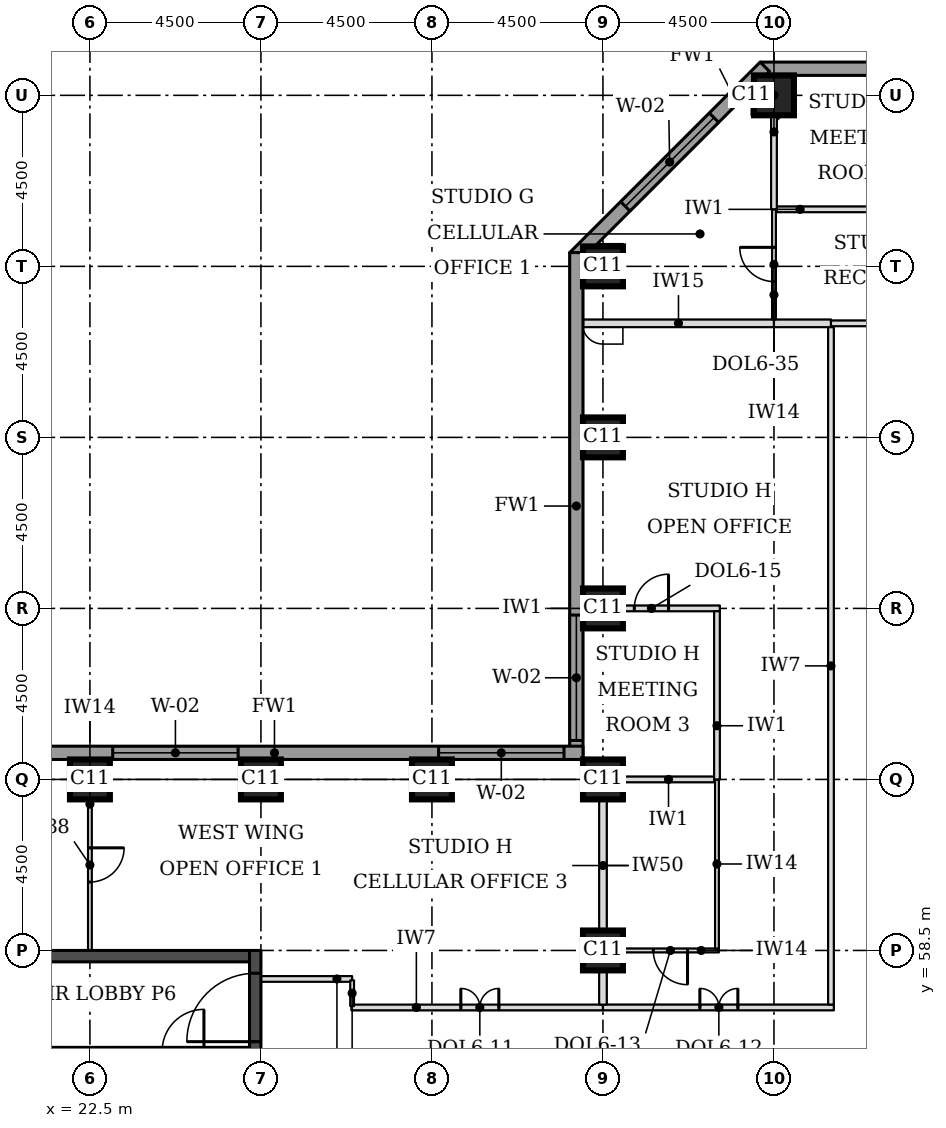
"""IFC4 building model, lengths in metres.
Left out: names, types, materials, properties, quantities, classifications, styles, units other than length and angle.
Written with IfcOpenShell. Run it as: python <this file> out.ifc"""

import sys

from ifc_helpers import new_model, si_unit, direction, frame, frame_2d, origin, origin_2d, place, context, subcontext, project, spatial, rectangle, extrude, element, fill, save


model = new_model("IFC4")
c1 = context("Model", 3, precision=1e-05, world=origin(), true_north=direction((0.0, 1.0)))
c2 = subcontext(c1, "Body", "Model", "MODEL_VIEW")
j1 = project(units=[si_unit("LENGTHUNIT", "METRE"), si_unit("PLANEANGLEUNIT", "RADIAN")], contexts=[c1])
p1 = place(None, origin())
s1 = spatial("IfcSite", under=j1, at=p1, CompositionType="ELEMENT")
p2 = place(p1, origin())
s2 = spatial("IfcBuilding", under=s1, at=p2, CompositionType="ELEMENT")
p3 = place(p2, frame((0.0, 0.0, 119.6)))
s3 = spatial("IfcBuildingStorey", under=s2, at=p3, CompositionType="ELEMENT", Elevation=119.6)
for number, where, z_axis, x_axis in (
    (1, (36.0, 58.5, 0.0), (0.0, 0.0, 1.0), (1.0, 0.0, 0.0)),
    (2, (22.5, 63.0, 0.0), (0.0, 0.0, 1.0), (1.0, 0.0, 0.0)),
    (3, (27.0, 63.0, 0.0), (0.0, 0.0, 1.0), (1.0, 0.0, 0.0)),
    (4, (31.5, 63.0, 0.0), (0.0, 0.0, 1.0), (1.0, 0.0, 0.0)),
    (5, (36.0, 63.0, 0.0), (0.0, 0.0, 1.0), (1.0, 0.0, 0.0)),
    (6, (36.0, 67.5, 0.0), (0.0, 0.0, 1.0), (1.0, 0.0, 0.0)),
    (7, (36.0, 72.0, 0.0), (0.0, 0.0, 1.0), (1.0, 0.0, 0.0)),
    (8, (36.0, 76.5, 0.0), (0.0, 0.0, 1.0), (1.0, 0.0, 0.0)),
    (9, (40.5, 81.0, 0.0), (0.0, 0.0, 1.0), (1.0, 0.0, 0.0)),
):
    element("IfcColumn", number, at=place(p3, frame(where, z_axis=z_axis, x_axis=x_axis)), inside=s3, PredefinedType="COLUMN", context=c2, shape_type="SweptSolid", body=[
        extrude(rectangle(XDim=1.05, YDim=1.05, at=origin_2d()), origin(), (0.0, 0.0, 1.0), 3.7),
    ])
p4 = place(p3, frame((18.3, 58.35, 0.0), z_axis=(0.0, 0.0, 1.0), x_axis=(1.0, 0.0, 0.0)))
e10 = element("IfcWall", 10, at=p4, inside=s3, PredefinedType="SHEAR", context=c2, shape_type="SweptSolid", body=[
    extrude(rectangle(XDim=8.4, YDim=0.3, at=frame_2d((4.2, 0.0))), origin(), (0.0, 0.0, 1.0), 3.7),
])
p5 = place(p3, frame((26.85, 49.5, 0.0), z_axis=(0.0, 0.0, 1.0), x_axis=(0.0, 1.0, 0.0)))
e11 = element("IfcWall", 11, at=p5, inside=s3, PredefinedType="SHEAR", context=c2, shape_type="SweptSolid", body=[
    extrude(rectangle(XDim=9.0, YDim=0.3, at=frame_2d((4.5, 0.0))), origin(), (0.0, 0.0, 1.0), 3.7),
])
p6 = place(p5, frame((6.6, 0.0, 0.0)))
e12 = element("IfcOpeningElement", 12, at=p6, cuts=e11, PredefinedType="OPENING", context=c2, shape_type="SweptSolid", body=[
    extrude(rectangle(XDim=1.8, YDim=2.1, at=frame_2d((0.9, 1.05))), frame((0.0, 0.16, 0.0), z_axis=(0.0, -1.0, 0.0), x_axis=(1.0, 0.0, 0.0)), (0.0, 0.0, 1.0), 0.32),
])
p7 = place(p3, frame((72.362, 81.7, 0.0), z_axis=(0.0, 0.0, 1.0), x_axis=(-1.0, 0.0, 0.0)))
e13 = element("IfcWall", 13, at=p7, inside=s3, PredefinedType="STANDARD", context=c2, shape_type="SweptSolid", body=[
    extrude(rectangle(XDim=32.225, YDim=0.35, at=frame_2d((16.112, 0.0))), origin(), (0.0, 0.0, 1.0), 3.525),
])
p8 = place(p7, frame((5.462, 0.0, 0.9)))
e14 = element("IfcOpeningElement", 14, at=p8, cuts=e13, PredefinedType="OPENING", context=c2, shape_type="SweptSolid", body=[
    extrude(rectangle(XDim=3.3, YDim=1.9, at=frame_2d((1.65, 0.95))), frame((0.0, 0.185, 0.0), z_axis=(0.0, -1.0, 0.0), x_axis=(1.0, 0.0, 0.0)), (0.0, 0.0, 1.0), 0.37),
])
p9 = place(p7, frame((9.962, 0.0, 0.9)))
e15 = element("IfcOpeningElement", 15, at=p9, cuts=e13, PredefinedType="OPENING", context=c2, shape_type="SweptSolid", body=[
    extrude(rectangle(XDim=3.3, YDim=1.9, at=frame_2d((1.65, 0.95))), frame((0.0, 0.185, 0.0), z_axis=(0.0, -1.0, 0.0), x_axis=(1.0, 0.0, 0.0)), (0.0, 0.0, 1.0), 0.37),
])
p10 = place(p7, frame((14.462, 0.0, 0.9)))
e16 = element("IfcOpeningElement", 16, at=p10, cuts=e13, PredefinedType="OPENING", context=c2, shape_type="SweptSolid", body=[
    extrude(rectangle(XDim=3.3, YDim=1.9, at=frame_2d((1.65, 0.95))), frame((0.0, 0.185, 0.0), z_axis=(0.0, -1.0, 0.0), x_axis=(1.0, 0.0, 0.0)), (0.0, 0.0, 1.0), 0.37),
])
p11 = place(p7, frame((18.962, 0.0, 0.9)))
e17 = element("IfcOpeningElement", 17, at=p11, cuts=e13, PredefinedType="OPENING", context=c2, shape_type="SweptSolid", body=[
    extrude(rectangle(XDim=3.3, YDim=1.9, at=frame_2d((1.65, 0.95))), frame((0.0, 0.185, 0.0), z_axis=(0.0, -1.0, 0.0), x_axis=(1.0, 0.0, 0.0)), (0.0, 0.0, 1.0), 0.37),
])
p12 = place(p7, frame((23.462, 0.0, 0.9)))
e18 = element("IfcOpeningElement", 18, at=p12, cuts=e13, PredefinedType="OPENING", context=c2, shape_type="SweptSolid", body=[
    extrude(rectangle(XDim=3.3, YDim=1.9, at=frame_2d((1.65, 0.95))), frame((0.0, 0.185, 0.0), z_axis=(0.0, -1.0, 0.0), x_axis=(1.0, 0.0, 0.0)), (0.0, 0.0, 1.0), 0.37),
])
p13 = place(p3, frame((40.261, 81.751, 0.0), z_axis=(0.0, 0.0, 1.0), x_axis=(-0.707106781187, -0.707106781187, 0.0)))
e19 = element("IfcWall", 19, at=p13, inside=s3, PredefinedType="STANDARD", context=c2, shape_type="SweptSolid", body=[
    extrude(rectangle(XDim=7.089, YDim=0.35, at=frame_2d((3.544, 0.0))), origin(), (0.0, 0.0, 1.0), 3.525),
])
p14 = place(p13, frame((1.894, 0.0, 0.9)))
e20 = element("IfcOpeningElement", 20, at=p14, cuts=e19, PredefinedType="OPENING", context=c2, shape_type="SweptSolid", body=[
    extrude(rectangle(XDim=3.3, YDim=1.9, at=frame_2d((1.65, 0.95))), frame((0.0, 0.185, 0.0), z_axis=(0.0, -1.0, 0.0), x_axis=(1.0, 0.0, 0.0)), (0.0, 0.0, 1.0), 0.37),
])
p15 = place(p3, frame((35.3, 76.862, 0.0), z_axis=(0.0, 0.0, 1.0), x_axis=(0.0, -1.0, 0.0)))
e21 = element("IfcWall", 21, at=p15, inside=s3, PredefinedType="STANDARD", context=c2, shape_type="SweptSolid", body=[
    extrude(rectangle(XDim=13.337, YDim=0.35, at=frame_2d((6.669, 0.0))), origin(), (0.0, 0.0, 1.0), 3.525),
])
p16 = place(p15, frame((9.537, 0.0, 0.9)))
e22 = element("IfcOpeningElement", 22, at=p16, cuts=e21, PredefinedType="OPENING", context=c2, shape_type="SweptSolid", body=[
    extrude(rectangle(XDim=3.3, YDim=1.9, at=frame_2d((1.65, 0.95))), frame((0.0, 0.185, 0.0), z_axis=(0.0, -1.0, 0.0), x_axis=(1.0, 0.0, 0.0)), (0.0, 0.0, 1.0), 0.37),
])
p17 = place(p3, frame((35.475, 63.7, 0.0), z_axis=(0.0, 0.0, 1.0), x_axis=(-1.0, 0.0, 0.0)))
e23 = element("IfcWall", 23, at=p17, inside=s3, PredefinedType="STANDARD", context=c2, shape_type="SweptSolid", body=[
    extrude(rectangle(XDim=17.837, YDim=0.35, at=frame_2d((8.919, 0.0))), origin(), (0.0, 0.0, 1.0), 3.525),
])
p18 = place(p17, frame((0.5, 0.0, 0.9)))
e24 = element("IfcOpeningElement", 24, at=p18, cuts=e23, PredefinedType="OPENING", context=c2, shape_type="SweptSolid", body=[
    extrude(rectangle(XDim=3.3, YDim=1.9, at=frame_2d((1.65, 0.95))), frame((0.0, 0.185, 0.0), z_axis=(0.0, -1.0, 0.0), x_axis=(1.0, 0.0, 0.0)), (0.0, 0.0, 1.0), 0.37),
])
p19 = place(p17, frame((9.075, 0.0, 0.9)))
e25 = element("IfcOpeningElement", 25, at=p19, cuts=e23, PredefinedType="OPENING", context=c2, shape_type="SweptSolid", body=[
    extrude(rectangle(XDim=3.3, YDim=1.9, at=frame_2d((1.65, 0.95))), frame((0.0, 0.185, 0.0), z_axis=(0.0, -1.0, 0.0), x_axis=(1.0, 0.0, 0.0)), (0.0, 0.0, 1.0), 0.37),
])
p20 = place(p3, frame((29.38, 57.0, 0.0), z_axis=(0.0, 0.0, 1.0), x_axis=(1.0, 0.0, 0.0)))
e26 = element("IfcWall", 26, at=p20, inside=s3, PredefinedType="PARTITIONING", context=c2, shape_type="SweptSolid", body=[
    extrude(rectangle(XDim=6.62, YDim=0.15, at=frame_2d((3.31, 0.0))), origin(), (0.0, 0.0, 1.0), 3.55),
])
p21 = place(p20, frame((2.88, 0.0, 0.0)))
e27 = element("IfcOpeningElement", 27, at=p21, cuts=e26, PredefinedType="OPENING", context=c2, shape_type="SweptSolid", body=[
    extrude(rectangle(XDim=1.0, YDim=2.1, at=frame_2d((0.5, 1.05))), frame((0.0, 0.085, 0.0), z_axis=(0.0, -1.0, 0.0), x_axis=(1.0, 0.0, 0.0)), (0.0, 0.0, 1.0), 0.17),
])
p22 = place(p3, frame((36.0, 57.0, 0.0), z_axis=(0.0, 0.0, 1.0), x_axis=(1.0, 0.0, 0.0)))
e28 = element("IfcWall", 28, at=p22, inside=s3, PredefinedType="PARTITIONING", context=c2, shape_type="SweptSolid", body=[
    extrude(rectangle(XDim=6.075, YDim=0.15, at=frame_2d((3.038, 0.0))), origin(), (0.0, 0.0, 1.0), 3.55),
])
p23 = place(p22, frame((2.55, 0.0, 0.0)))
e29 = element("IfcOpeningElement", 29, at=p23, cuts=e28, PredefinedType="OPENING", context=c2, shape_type="SweptSolid", body=[
    extrude(rectangle(XDim=1.0, YDim=2.1, at=frame_2d((0.5, 1.05))), frame((0.0, 0.085, 0.0), z_axis=(0.0, -1.0, 0.0), x_axis=(1.0, 0.0, 0.0)), (0.0, 0.0, 1.0), 0.17),
])
p24 = place(p3, frame((36.525, 58.5, 0.0), z_axis=(0.0, 0.0, 1.0), x_axis=(1.0, 0.0, 0.0)))
e30 = element("IfcWall", 30, at=p24, inside=s3, PredefinedType="PARTITIONING", context=c2, shape_type="SweptSolid", body=[
    extrude(rectangle(XDim=2.525, YDim=0.1, at=frame_2d((1.263, 0.0))), origin(), (0.0, 0.0, 1.0), 3.55),
])
p25 = place(p24, frame((0.8, 0.0, 0.0)))
e31 = element("IfcOpeningElement", 31, at=p25, cuts=e30, PredefinedType="OPENING", context=c2, shape_type="SweptSolid", body=[
    extrude(rectangle(XDim=0.9, YDim=2.1, at=frame_2d((0.45, 1.05))), frame((0.0, 0.06, 0.0), z_axis=(0.0, -1.0, 0.0), x_axis=(1.0, 0.0, 0.0)), (0.0, 0.0, 1.0), 0.12),
])
p26 = place(p3, frame((36.525, 63.0, 0.0), z_axis=(0.0, 0.0, 1.0), x_axis=(1.0, 0.0, 0.0)))
e32 = element("IfcWall", 32, at=p26, inside=s3, PredefinedType="PARTITIONING", context=c2, shape_type="SweptSolid", body=[
    extrude(rectangle(XDim=2.4, YDim=0.15, at=frame_2d((1.2, 0.0))), origin(), (0.0, 0.0, 1.0), 3.55),
])
p27 = place(p3, frame((35.475, 67.5, 0.0), z_axis=(0.0, 0.0, 1.0), x_axis=(1.0, 0.0, 0.0)))
e33 = element("IfcWall", 33, at=p27, inside=s3, PredefinedType="PARTITIONING", context=c2, shape_type="SweptSolid", body=[
    extrude(rectangle(XDim=3.6, YDim=0.15, at=frame_2d((1.8, 0.0))), origin(), (0.0, 0.0, 1.0), 3.55),
])
p28 = place(p27, frame((1.35, 0.0, 0.0)))
e34 = element("IfcOpeningElement", 34, at=p28, cuts=e33, PredefinedType="OPENING", context=c2, shape_type="SweptSolid", body=[
    extrude(rectangle(XDim=0.9, YDim=2.1, at=frame_2d((0.45, 1.05))), frame((0.0, 0.085, 0.0), z_axis=(0.0, -1.0, 0.0), x_axis=(1.0, 0.0, 0.0)), (0.0, 0.0, 1.0), 0.17),
])
p29 = place(p3, frame((35.475, 75.0, 0.0), z_axis=(0.0, 0.0, 1.0), x_axis=(1.0, 0.0, 0.0)))
e35 = element("IfcWall", 35, at=p29, inside=s3, PredefinedType="PARTITIONING", context=c2, shape_type="SweptSolid", body=[
    extrude(rectangle(XDim=5.025, YDim=0.2, at=frame_2d((2.512, 0.0))), origin(), (0.0, 0.0, 1.0), 3.55),
])
p30 = place(p3, frame((40.5, 75.0, 0.0), z_axis=(0.0, 0.0, 1.0), x_axis=(1.0, 0.0, 0.0)))
e36 = element("IfcWall", 36, at=p30, inside=s3, PredefinedType="PARTITIONING", context=c2, shape_type="SweptSolid", body=[
    extrude(rectangle(XDim=1.5, YDim=0.2, at=frame_2d((0.75, 0.0))), origin(), (0.0, 0.0, 1.0), 3.55),
])
p31 = place(p3, frame((42.0, 75.0, 0.0), z_axis=(0.0, 0.0, 1.0), x_axis=(1.0, 0.0, 0.0)))
e37 = element("IfcWall", 37, at=p31, inside=s3, PredefinedType="PARTITIONING", context=c2, shape_type="SweptSolid", body=[
    extrude(rectangle(XDim=4.5, YDim=0.15, at=frame_2d((2.25, 0.0))), origin(), (0.0, 0.0, 1.0), 3.55),
])
p32 = place(p31, frame((1.75, 0.0, 0.0)))
e38 = element("IfcOpeningElement", 38, at=p32, cuts=e37, PredefinedType="OPENING", context=c2, shape_type="SweptSolid", body=[
    extrude(rectangle(XDim=1.0, YDim=2.1, at=frame_2d((0.5, 1.05))), frame((0.0, 0.085, 0.0), z_axis=(0.0, -1.0, 0.0), x_axis=(1.0, 0.0, 0.0)), (0.0, 0.0, 1.0), 0.17),
])
p33 = place(p3, frame((40.575, 78.0, 0.0), z_axis=(0.0, 0.0, 1.0), x_axis=(1.0, 0.0, 0.0)))
e39 = element("IfcWall", 39, at=p33, inside=s3, PredefinedType="PARTITIONING", context=c2, shape_type="SweptSolid", body=[
    extrude(rectangle(XDim=4.425, YDim=0.15, at=frame_2d((2.212, 0.0))), origin(), (0.0, 0.0, 1.0), 3.55),
])
p34 = place(p3, frame((36.0, 57.075, 0.0), z_axis=(0.0, 0.0, 1.0), x_axis=(0.0, 1.0, 0.0)))
e40 = element("IfcWall", 40, at=p34, inside=s3, PredefinedType="PARTITIONING", context=c2, shape_type="SweptSolid", body=[
    extrude(rectangle(XDim=0.9, YDim=0.2, at=frame_2d((0.45, 0.0))), origin(), (0.0, 0.0, 1.0), 2.8),
])
p35 = place(p3, frame((42.0, 57.075, 0.0), z_axis=(0.0, 0.0, 1.0), x_axis=(0.0, 1.0, 0.0)))
e41 = element("IfcWall", 41, at=p35, inside=s3, PredefinedType="PARTITIONING", context=c2, shape_type="SweptSolid", body=[
    extrude(rectangle(XDim=17.825, YDim=0.15, at=frame_2d((8.913, 0.0))), origin(), (0.0, 0.0, 1.0), 3.55),
])
p36 = place(p3, frame((39.0, 58.55, 0.0), z_axis=(0.0, 0.0, 1.0), x_axis=(0.0, 1.0, 0.0)))
e42 = element("IfcWall", 42, at=p36, inside=s3, PredefinedType="PARTITIONING", context=c2, shape_type="SweptSolid", body=[
    extrude(rectangle(XDim=4.45, YDim=0.1, at=frame_2d((2.225, 0.0))), origin(), (0.0, 0.0, 1.0), 3.55),
])
p37 = place(p3, frame((36.0, 58.995, 0.0), z_axis=(0.0, 0.0, 1.0), x_axis=(0.0, 1.0, 0.0)))
e43 = element("IfcWall", 43, at=p37, inside=s3, PredefinedType="PARTITIONING", context=c2, shape_type="SweptSolid", body=[
    extrude(rectangle(XDim=3.48, YDim=0.2, at=frame_2d((1.74, 0.0))), origin(), (0.0, 0.0, 1.0), 2.8),
])
p38 = place(p3, frame((39.0, 63.0, 0.0), z_axis=(0.0, 0.0, 1.0), x_axis=(0.0, 1.0, 0.0)))
e44 = element("IfcWall", 44, at=p38, inside=s3, PredefinedType="PARTITIONING", context=c2, shape_type="SweptSolid", body=[
    extrude(rectangle(XDim=4.425, YDim=0.15, at=frame_2d((2.212, 0.0))), origin(), (0.0, 0.0, 1.0), 3.55),
])
p39 = place(p3, frame((40.5, 75.1, 0.0), z_axis=(0.0, 0.0, 1.0), x_axis=(0.0, 1.0, 0.0)))
e45 = element("IfcWall", 45, at=p39, inside=s3, PredefinedType="PARTITIONING", context=c2, shape_type="SweptSolid", body=[
    extrude(rectangle(XDim=2.9, YDim=0.1, at=frame_2d((1.45, 0.0))), origin(), (0.0, 0.0, 1.0), 3.55),
])
p40 = place(p39, frame((1.0, 0.0, 0.0)))
e46 = element("IfcOpeningElement", 46, at=p40, cuts=e45, PredefinedType="OPENING", context=c2, shape_type="SweptSolid", body=[
    extrude(rectangle(XDim=0.9, YDim=2.1, at=frame_2d((0.45, 1.05))), frame((0.0, 0.06, 0.0), z_axis=(0.0, -1.0, 0.0), x_axis=(1.0, 0.0, 0.0)), (0.0, 0.0, 1.0), 0.12),
])
p41 = place(p3, frame((40.5, 78.0, 0.0), z_axis=(0.0, 0.0, 1.0), x_axis=(0.0, 1.0, 0.0)))
e47 = element("IfcWall", 47, at=p41, inside=s3, PredefinedType="PARTITIONING", context=c2, shape_type="SweptSolid", body=[
    extrude(rectangle(XDim=2.475, YDim=0.15, at=frame_2d((1.238, 0.0))), origin(), (0.0, 0.0, 1.0), 3.55),
])
p42 = place(p3, frame((22.5, 63.0, 0.0), z_axis=(0.0, 0.0, 1.0), x_axis=(0.0, -1.0, 0.0)))
e48 = element("IfcWall", 48, at=p42, inside=s3, PredefinedType="PARTITIONING", context=c2, shape_type="SweptSolid", body=[
    extrude(rectangle(XDim=4.5, YDim=0.1, at=frame_2d((2.25, 0.0))), origin(), (0.0, 0.0, 1.0), 3.55),
])
p43 = place(p42, frame((1.8, 0.0, 0.0)))
e49 = element("IfcOpeningElement", 49, at=p43, cuts=e48, PredefinedType="OPENING", context=c2, shape_type="SweptSolid", body=[
    extrude(rectangle(XDim=0.9, YDim=2.1, at=frame_2d((0.45, 1.05))), frame((0.0, 0.06, 0.0), z_axis=(0.0, -1.0, 0.0), x_axis=(1.0, 0.0, 0.0)), (0.0, 0.0, 1.0), 0.12),
])
p44 = place(p3, frame((27.0, 57.75, 0.0), z_axis=(0.0, 0.0, 1.0), x_axis=(1.0, 0.0, 0.0)))
e50 = element("IfcWall", 50, at=p44, inside=s3, PredefinedType="PARTITIONING", context=c2, shape_type="SweptSolid", body=[
    extrude(rectangle(XDim=2.4, YDim=0.15, at=frame_2d((1.2, 0.0))), origin(), (0.0, 0.0, 1.0), 3.55),
])
p45 = place(p3, frame((29.4, 57.715, 0.0), z_axis=(0.0, 0.0, 1.0), x_axis=(0.0, -1.0, 0.0)))
e51 = element("IfcWall", 51, at=p45, inside=s3, PredefinedType="PARTITIONING", context=c2, shape_type="SweptSolid", body=[
    extrude(rectangle(XDim=0.68, YDim=0.1, at=frame_2d((0.34, 0.0))), origin(), (0.0, 0.0, 1.0), 3.55),
])
p46 = place(p3, frame((21.8, 55.85, 0.0), z_axis=(0.0, 0.0, 1.0), x_axis=(1.0, 0.0, 0.0)))
e52 = element("IfcWall", 52, at=p46, inside=s3, PredefinedType="SOLIDWALL", context=c2, shape_type="SweptSolid", body=[
    extrude(rectangle(XDim=1.4, YDim=0.2, at=frame_2d((0.7, 0.0))), origin(), (0.0, 0.0, 1.0), 3.55),
])
p47 = place(p3, frame((18.3, 55.85, 0.0), z_axis=(0.0, 0.0, 1.0), x_axis=(1.0, 0.0, 0.0)))
e53 = element("IfcWall", 53, at=p47, inside=s3, PredefinedType="SOLIDWALL", context=c2, shape_type="SweptSolid", body=[
    extrude(rectangle(XDim=3.5, YDim=0.2, at=frame_2d((1.75, 0.0))), origin(), (0.0, 0.0, 1.0), 3.55),
])
p48 = place(p47, frame((1.2, 0.0, 0.0)))
e54 = element("IfcOpeningElement", 54, at=p48, cuts=e53, PredefinedType="OPENING", context=c2, shape_type="SweptSolid", body=[
    extrude(rectangle(XDim=1.1, YDim=2.1, at=frame_2d((0.55, 1.05))), frame((0.0, 0.11, 0.0), z_axis=(0.0, -1.0, 0.0), x_axis=(1.0, 0.0, 0.0)), (0.0, 0.0, 1.0), 0.22),
])
p49 = place(p3, frame((23.2, 55.85, 0.0), z_axis=(0.0, 0.0, 1.0), x_axis=(1.0, 0.0, 0.0)))
e55 = element("IfcWall", 55, at=p49, inside=s3, PredefinedType="SOLIDWALL", context=c2, shape_type="SweptSolid", body=[
    extrude(rectangle(XDim=3.5, YDim=0.2, at=frame_2d((1.75, 0.0))), origin(), (0.0, 0.0, 1.0), 3.55),
])
p50 = place(p49, frame((1.2, 0.0, 0.0)))
e56 = element("IfcOpeningElement", 56, at=p50, cuts=e55, PredefinedType="OPENING", context=c2, shape_type="SweptSolid", body=[
    extrude(rectangle(XDim=1.1, YDim=2.1, at=frame_2d((0.55, 1.05))), frame((0.0, 0.11, 0.0), z_axis=(0.0, -1.0, 0.0), x_axis=(1.0, 0.0, 0.0)), (0.0, 0.0, 1.0), 0.22),
])
p51 = place(p14, origin())
e57 = element("IfcWindow", 57, at=p51, inside=s3, PartitioningType="SINGLE_PANEL", PredefinedType="WINDOW", context=c2, shape_type="SweptSolid", body=[
    extrude(rectangle(XDim=3.3, YDim=1.9, at=frame_2d((1.65, 0.95))), frame((0.0, 0.085, 0.0), z_axis=(0.0, -1.0, 0.0), x_axis=(1.0, 0.0, 0.0)), (0.0, 0.0, 1.0), 0.06),
])
fill(e20, e57)
p52 = place(p16, origin())
e58 = element("IfcWindow", 58, at=p52, inside=s3, PartitioningType="SINGLE_PANEL", PredefinedType="WINDOW", context=c2, shape_type="SweptSolid", body=[
    extrude(rectangle(XDim=3.3, YDim=1.9, at=frame_2d((1.65, 0.95))), frame((0.0, 0.085, 0.0), z_axis=(0.0, -1.0, 0.0), x_axis=(1.0, 0.0, 0.0)), (0.0, 0.0, 1.0), 0.06),
])
fill(e22, e58)
p53 = place(p18, origin())
e59 = element("IfcWindow", 59, at=p53, inside=s3, PartitioningType="SINGLE_PANEL", PredefinedType="WINDOW", context=c2, shape_type="SweptSolid", body=[
    extrude(rectangle(XDim=3.3, YDim=1.9, at=frame_2d((1.65, 0.95))), frame((0.0, 0.085, 0.0), z_axis=(0.0, -1.0, 0.0), x_axis=(1.0, 0.0, 0.0)), (0.0, 0.0, 1.0), 0.06),
])
fill(e24, e59)
p54 = place(p19, origin())
e60 = element("IfcWindow", 60, at=p54, inside=s3, PartitioningType="SINGLE_PANEL", PredefinedType="WINDOW", context=c2, shape_type="SweptSolid", body=[
    extrude(rectangle(XDim=3.3, YDim=1.9, at=frame_2d((1.65, 0.95))), frame((0.0, 0.085, 0.0), z_axis=(0.0, -1.0, 0.0), x_axis=(1.0, 0.0, 0.0)), (0.0, 0.0, 1.0), 0.06),
])
fill(e25, e60)
p55 = place(p40, origin())
e61 = element("IfcDoor", 61, at=p55, inside=s3, OperationType="SINGLE_SWING_RIGHT", PredefinedType="DOOR", context=c2, shape_type="SweptSolid", body=[
    extrude(rectangle(XDim=0.9, YDim=2.1, at=frame_2d((0.45, 1.05))), frame((0.0, 0.025, 0.0), z_axis=(0.0, -1.0, 0.0), x_axis=(1.0, 0.0, 0.0)), (0.0, 0.0, 1.0), 0.05),
])
fill(e46, e61)
p56 = place(p23, origin())
e62 = element("IfcDoor", 62, at=p56, inside=s3, OperationType="DOUBLE_DOOR_SINGLE_SWING", PredefinedType="DOOR", context=c2, shape_type="SweptSolid", body=[
    extrude(rectangle(XDim=1.0, YDim=2.1, at=frame_2d((0.5, 1.05))), frame((0.0, 0.025, 0.0), z_axis=(0.0, -1.0, 0.0), x_axis=(1.0, 0.0, 0.0)), (0.0, 0.0, 1.0), 0.05),
])
fill(e29, e62)
p57 = place(p25, frame((0.9, 0.0, 0.0), z_axis=(0.0, 0.0, 1.0), x_axis=(-1.0, 0.0, 0.0)))
e63 = element("IfcDoor", 63, at=p57, inside=s3, OperationType="SINGLE_SWING_LEFT", PredefinedType="DOOR", context=c2, shape_type="SweptSolid", body=[
    extrude(rectangle(XDim=0.9, YDim=2.1, at=frame_2d((0.45, 1.05))), frame((0.0, 0.025, 0.0), z_axis=(0.0, -1.0, 0.0), x_axis=(1.0, 0.0, 0.0)), (0.0, 0.0, 1.0), 0.05),
])
fill(e31, e63)
p58 = place(p28, origin())
e64 = element("IfcDoor", 64, at=p58, inside=s3, OperationType="SINGLE_SWING_RIGHT", PredefinedType="DOOR", context=c2, shape_type="SweptSolid", body=[
    extrude(rectangle(XDim=0.9, YDim=2.1, at=frame_2d((0.45, 1.05))), frame((0.0, 0.025, 0.0), z_axis=(0.0, -1.0, 0.0), x_axis=(1.0, 0.0, 0.0)), (0.0, 0.0, 1.0), 0.05),
])
fill(e34, e64)
p59 = place(p21, origin())
e65 = element("IfcDoor", 65, at=p59, inside=s3, OperationType="DOUBLE_DOOR_SINGLE_SWING", PredefinedType="DOOR", context=c2, shape_type="SweptSolid", body=[
    extrude(rectangle(XDim=1.0, YDim=2.1, at=frame_2d((0.5, 1.05))), frame((0.0, 0.025, 0.0), z_axis=(0.0, -1.0, 0.0), x_axis=(1.0, 0.0, 0.0)), (0.0, 0.0, 1.0), 0.05),
])
fill(e27, e65)
p60 = place(p43, origin())
e66 = element("IfcDoor", 66, at=p60, inside=s3, OperationType="SINGLE_SWING_LEFT", PredefinedType="DOOR", context=c2, shape_type="SweptSolid", body=[
    extrude(rectangle(XDim=0.9, YDim=2.1, at=frame_2d((0.45, 1.05))), frame((0.0, 0.025, 0.0), z_axis=(0.0, -1.0, 0.0), x_axis=(1.0, 0.0, 0.0)), (0.0, 0.0, 1.0), 0.05),
])
fill(e49, e66)
p61 = place(p6, origin())
e67 = element("IfcDoor", 67, at=p61, inside=s3, OperationType="SINGLE_SWING_LEFT", PredefinedType="DOOR", context=c2, shape_type="SweptSolid", body=[
    extrude(rectangle(XDim=1.8, YDim=2.1, at=frame_2d((0.9, 1.05))), frame((0.0, 0.025, 0.0), z_axis=(0.0, -1.0, 0.0), x_axis=(1.0, 0.0, 0.0)), (0.0, 0.0, 1.0), 0.05),
])
fill(e12, e67)
save(model, sys.argv[1])
